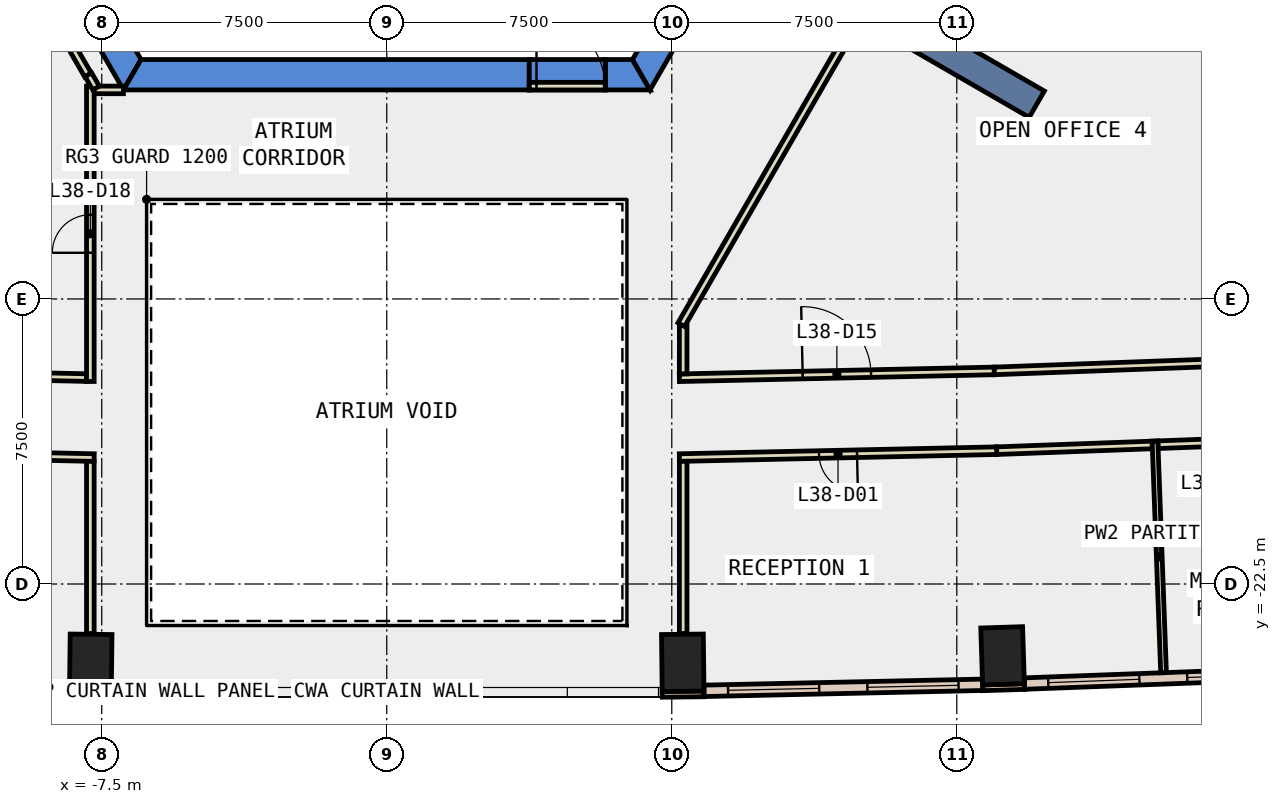
"""IFC4 building model, lengths in metres.
Left out: names, types, materials, properties, quantities, classifications, styles, units other than length and angle.
Written with IfcOpenShell. Run it as: python <this file> out.ifc"""

import sys

from ifc_helpers import new_model, si_unit, direction, frame, frame_2d, origin, origin_2d, place, context, subcontext, project, spatial, polyline, rectangle, outline, extrude, element, fill, save


model = new_model("IFC4")
c1 = context("Model", 3, precision=1e-05, world=origin(), true_north=direction((0.0, 1.0)))
c2 = subcontext(c1, "Body", "Model", "MODEL_VIEW")
j1 = project(units=[si_unit("LENGTHUNIT", "METRE"), si_unit("PLANEANGLEUNIT", "RADIAN")], contexts=[c1])
p1 = place(None, origin())
s1 = spatial("IfcSite", under=j1, at=p1, CompositionType="ELEMENT")
p2 = place(p1, origin())
s2 = spatial("IfcBuilding", under=s1, at=p2, CompositionType="ELEMENT")
p3 = place(p2, frame((0.0, 0.0, 171.8)))
s3 = spatial("IfcBuildingStorey", under=s2, at=p3, CompositionType="ELEMENT", Elevation=171.8)
for number, where, z_axis, x_axis in (
    (1, (-7.789, -24.573, -0.4), (0.0, 0.0, 1.0), (-1.0, 0.012, 0.0)),
    (2, (7.789, -24.573, -0.4), (0.0, 0.0, 1.0), (1.0, 0.012, 0.0)),
    (3, (16.205, -24.39, -0.4), (0.0, 0.0, 1.0), (0.999, 0.032, 0.0)),
):
    element("IfcColumn", number, at=place(p3, frame(where, z_axis=z_axis, x_axis=x_axis)), inside=s3, PredefinedType="COLUMN", context=c2, shape_type="SweptSolid", body=[
        extrude(rectangle(XDim=1.1, YDim=1.5, at=origin_2d()), origin(), (0.0, 0.0, 1.0), 4.2),
    ])
p4 = place(p3, frame((0.0, 0.0, -0.4)))
e4 = element("IfcWall", 4, at=p4, inside=s3, PredefinedType="SHEAR", context=c2, shape_type="SweptSolid", body=[
    extrude(outline(polyline([(-13.856, 2.5), (-6.928, -9.5), (-6.466, -8.7), (-12.933, 2.5), (-13.856, 2.5)])), origin(), (0.0, 0.0, 1.0), 4.2),
])
p5 = place(p3, frame((0.0, 0.0, -0.4)))
e5 = element("IfcWall", 5, at=p5, inside=s3, PredefinedType="SHEAR", context=c2, shape_type="SweptSolid", body=[
    extrude(outline(polyline([(3.75, -9.5), (3.75, -8.7), (-6.466, -8.7), (-6.928, -9.5), (3.75, -9.5)])), origin(), (0.0, 0.0, 1.0), 4.2),
])
p6 = place(p3, frame((0.0, 0.0, -0.4)))
e6 = element("IfcWall", 6, at=p6, inside=s3, PredefinedType="SHEAR", context=c2, shape_type="SweptSolid", body=[
    extrude(outline(polyline([(5.75, -8.7), (5.75, -9.5), (6.928, -9.5), (6.466, -8.7), (5.75, -8.7)])), origin(), (0.0, 0.0, 1.0), 4.2),
])
p7 = place(p3, frame((0.0, 0.0, 3.6)))
e7 = element("IfcWall", 7, at=p7, inside=s3, PredefinedType="SHEAR", context=c2, shape_type="SweptSolid", body=[
    extrude(outline(polyline([(5.75, -9.5), (5.75, -8.7), (3.75, -8.7), (3.75, -9.5), (5.75, -9.5)])), origin(), (0.0, 0.0, 1.0), 0.2),
])
p8 = place(p3, frame((0.0, 0.0, -0.4)))
e8 = element("IfcWall", 8, at=p8, inside=s3, PredefinedType="SHEAR", context=c2, shape_type="SweptSolid", body=[
    extrude(outline(polyline([(8.117, -7.44), (7.424, -7.04), (6.466, -8.7), (6.928, -9.5), (8.117, -7.44)])), origin(), (0.0, 0.0, 1.0), 4.2),
])
p9 = place(p3, frame((9.31, -5.375, -0.4), z_axis=(0.0, 0.0, 1.0), x_axis=(0.866017533419, -0.500013631625, 0.0)))
e9 = element("IfcWall", 9, at=p9, inside=s3, PredefinedType="SHEAR", context=c2, shape_type="SweptSolid", body=[
    extrude(rectangle(XDim=9.0, YDim=0.8, at=frame_2d((4.5, 0.0))), origin(), (0.0, 0.0, 1.0), 4.2),
])
for number, where, z_axis, x_axis in (
    (10, (-8.349, -25.392, 0.0), (0.0, 0.0, 1.0), (1.0, -0.011, 0.0)),
    (11, (7.249, -25.404, 0.0), (0.0, 0.0, 1.0), (1.0, 0.011, 0.0)),
):
    element("IfcWall", number, at=place(p3, frame(where, z_axis=z_axis, x_axis=x_axis)), inside=s3, PredefinedType="STANDARD", context=c2, shape_type="SweptSolid", body=[
        extrude(rectangle(XDim=1.1, YDim=0.15, at=frame_2d((0.55, 0.0))), origin(), (0.0, 0.0, 1.0), 3.8),
    ])
p10 = place(p3, frame((15.682, -25.232, 0.0), z_axis=(0.0, 0.0, 1.0), x_axis=(0.999523702549, 0.030860460829, 0.0)))
e12 = element("IfcWall", 12, at=p10, inside=s3, PredefinedType="STANDARD", context=c2, shape_type="SweptSolid", body=[
    extrude(rectangle(XDim=1.1, YDim=0.15, at=frame_2d((0.55, 0.0))), origin(), (0.0, 0.0, 1.0), 3.8),
])
p11 = place(p3, frame((-15.68, -25.152, 0.0), z_axis=(0.0, 0.0, 1.0), x_axis=(0.999765201774, -0.021668902196, 0.0)))
e13 = element("IfcWall", 13, at=p11, inside=s3, PredefinedType="STANDARD", context=c2, shape_type="SweptSolid", body=[
    extrude(rectangle(XDim=7.335, YDim=0.3, at=frame_2d((3.667, 0.0))), origin(), (0.0, 0.0, 1.0), 3.8),
])
p12 = place(p11, frame((0.634, 0.0, 0.9)))
e14 = element("IfcOpeningElement", 14, at=p12, cuts=e13, PredefinedType="OPENING", context=c2, shape_type="SweptSolid", body=[
    extrude(rectangle(XDim=2.4, YDim=2.6, at=frame_2d((1.2, 1.3))), frame((0.0, 0.16, 0.0), z_axis=(0.0, -1.0, 0.0), x_axis=(1.0, 0.0, 0.0)), (0.0, 0.0, 1.0), 0.32),
])
p13 = place(p11, frame((4.301, 0.0, 0.9)))
e15 = element("IfcOpeningElement", 15, at=p13, cuts=e13, PredefinedType="OPENING", context=c2, shape_type="SweptSolid", body=[
    extrude(rectangle(XDim=2.4, YDim=2.6, at=frame_2d((1.2, 1.3))), frame((0.0, 0.16, 0.0), z_axis=(0.0, -1.0, 0.0), x_axis=(1.0, 0.0, 0.0)), (0.0, 0.0, 1.0), 0.32),
])
p14 = place(p3, frame((8.347, -25.311, 0.0), z_axis=(0.0, 0.0, 1.0), x_axis=(0.999765201774, 0.021668902196, 0.0)))
e16 = element("IfcWall", 16, at=p14, inside=s3, PredefinedType="STANDARD", context=c2, shape_type="SweptSolid", body=[
    extrude(rectangle(XDim=7.335, YDim=0.3, at=frame_2d((3.667, 0.0))), origin(), (0.0, 0.0, 1.0), 3.8),
])
p15 = place(p14, frame((0.634, 0.0, 0.9)))
e17 = element("IfcOpeningElement", 17, at=p15, cuts=e16, PredefinedType="OPENING", context=c2, shape_type="SweptSolid", body=[
    extrude(rectangle(XDim=2.4, YDim=2.6, at=frame_2d((1.2, 1.3))), frame((0.0, 0.16, 0.0), z_axis=(0.0, -1.0, 0.0), x_axis=(1.0, 0.0, 0.0)), (0.0, 0.0, 1.0), 0.32),
])
p16 = place(p14, frame((4.301, 0.0, 0.9)))
e18 = element("IfcOpeningElement", 18, at=p16, cuts=e16, PredefinedType="OPENING", context=c2, shape_type="SweptSolid", body=[
    extrude(rectangle(XDim=2.4, YDim=2.6, at=frame_2d((1.2, 1.3))), frame((0.0, 0.16, 0.0), z_axis=(0.0, -1.0, 0.0), x_axis=(1.0, 0.0, 0.0)), (0.0, 0.0, 1.0), 0.32),
])
p17 = place(p3, frame((16.778, -25.12, 0.0), z_axis=(0.0, 0.0, 1.0), x_axis=(0.999307730926, 0.037202942236, 0.0)))
e19 = element("IfcWall", 19, at=p17, inside=s3, PredefinedType="STANDARD", context=c2, shape_type="SweptSolid", body=[
    extrude(rectangle(XDim=7.317, YDim=0.3, at=frame_2d((3.659, 0.0))), origin(), (0.0, 0.0, 1.0), 3.8),
])
p18 = place(p17, frame((0.629, 0.0, 0.9)))
e20 = element("IfcOpeningElement", 20, at=p18, cuts=e19, PredefinedType="OPENING", context=c2, shape_type="SweptSolid", body=[
    extrude(rectangle(XDim=2.4, YDim=2.6, at=frame_2d((1.2, 1.3))), frame((0.0, 0.16, 0.0), z_axis=(0.0, -1.0, 0.0), x_axis=(1.0, 0.0, 0.0)), (0.0, 0.0, 1.0), 0.32),
])
p19 = place(p17, frame((4.288, 0.0, 0.9)))
e21 = element("IfcOpeningElement", 21, at=p19, cuts=e19, PredefinedType="OPENING", context=c2, shape_type="SweptSolid", body=[
    extrude(rectangle(XDim=2.4, YDim=2.6, at=frame_2d((1.2, 1.3))), frame((0.0, 0.16, 0.0), z_axis=(0.0, -1.0, 0.0), x_axis=(1.0, 0.0, 0.0)), (0.0, 0.0, 1.0), 0.32),
])
p20 = place(p3, frame((7.7, -17.073, 0.0), z_axis=(0.0, 0.0, 1.0), x_axis=(0.999764372799, 0.021707115919, 0.0)))
e22 = element("IfcWall", 22, at=p20, inside=s3, PredefinedType="PARTITIONING", context=c2, shape_type="SweptSolid", body=[
    extrude(rectangle(XDim=8.289, YDim=0.2, at=frame_2d((4.145, 0.0))), origin(), (0.0, 0.0, 1.0), 3.8),
])
p21 = place(p20, frame((3.245, 0.0, 0.0)))
e23 = element("IfcOpeningElement", 23, at=p21, cuts=e22, PredefinedType="OPENING", context=c2, shape_type="SweptSolid", body=[
    extrude(rectangle(XDim=1.8, YDim=2.1, at=frame_2d((0.9, 1.05))), frame((0.0, 0.11, 0.0), z_axis=(0.0, -1.0, 0.0), x_axis=(1.0, 0.0, 0.0)), (0.0, 0.0, 1.0), 0.22),
])
p22 = place(p3, frame((15.987, -16.893, 0.0), z_axis=(0.0, 0.0, 1.0), x_axis=(0.999316060953, 0.036978511606, 0.0)))
e24 = element("IfcWall", 24, at=p22, inside=s3, PredefinedType="PARTITIONING", context=c2, shape_type="SweptSolid", body=[
    extrude(rectangle(XDim=7.355, YDim=0.2, at=frame_2d((3.677, 0.0))), origin(), (0.0, 0.0, 1.0), 3.8),
])
p23 = place(p3, frame((-11.278, -16.996, 0.0), z_axis=(0.0, 0.0, 1.0), x_axis=(0.999766613119, -0.021603687022, 0.0)))
e25 = element("IfcWall", 25, at=p23, inside=s3, PredefinedType="PARTITIONING", context=c2, shape_type="SweptSolid", body=[
    extrude(rectangle(XDim=3.379, YDim=0.2, at=frame_2d((1.689, 0.0))), origin(), (0.0, 0.0, 1.0), 3.8),
])
p24 = place(p3, frame((20.143, -18.841, 0.0), z_axis=(0.0, 0.0, 1.0), x_axis=(-0.999321592708, -0.036828716339, 0.0)))
e26 = element("IfcWall", 26, at=p24, inside=s3, PredefinedType="PARTITIONING", context=c2, shape_type="SweptSolid", body=[
    extrude(rectangle(XDim=4.097, YDim=0.2, at=frame_2d((2.048, 0.0))), origin(), (0.0, 0.0, 1.0), 3.8),
])
p25 = place(p3, frame((16.049, -18.992, 0.0), z_axis=(0.0, 0.0, 1.0), x_axis=(-0.999762156504, -0.021808952826, 0.0)))
e27 = element("IfcWall", 27, at=p25, inside=s3, PredefinedType="PARTITIONING", context=c2, shape_type="SweptSolid", body=[
    extrude(rectangle(XDim=8.351, YDim=0.2, at=frame_2d((4.176, 0.0))), origin(), (0.0, 0.0, 1.0), 3.8),
])
p26 = place(p25, frame((3.675, 0.0, 0.0)))
e28 = element("IfcOpeningElement", 28, at=p26, cuts=e27, PredefinedType="OPENING", context=c2, shape_type="SweptSolid", body=[
    extrude(rectangle(XDim=1.0, YDim=2.1, at=frame_2d((0.5, 1.05))), frame((0.0, 0.11, 0.0), z_axis=(0.0, -1.0, 0.0), x_axis=(1.0, 0.0, 0.0)), (0.0, 0.0, 1.0), 0.22),
])
p27 = place(p3, frame((23.62, -18.712, 0.0), z_axis=(0.0, 0.0, 1.0), x_axis=(-0.999316841287, -0.03695741767, 0.0)))
e29 = element("IfcWall", 29, at=p27, inside=s3, PredefinedType="PARTITIONING", context=c2, shape_type="SweptSolid", body=[
    extrude(rectangle(XDim=3.329, YDim=0.2, at=frame_2d((1.665, 0.0))), origin(), (0.0, 0.0, 1.0), 3.8),
])
p28 = place(p27, frame((1.165, 0.0, 0.0)))
e30 = element("IfcOpeningElement", 30, at=p28, cuts=e29, PredefinedType="OPENING", context=c2, shape_type="SweptSolid", body=[
    extrude(rectangle(XDim=1.0, YDim=2.1, at=frame_2d((0.5, 1.05))), frame((0.0, 0.11, 0.0), z_axis=(0.0, -1.0, 0.0), x_axis=(1.0, 0.0, 0.0)), (0.0, 0.0, 1.0), 0.22),
])
p29 = place(p3, frame((-7.7, -19.174, 0.0), z_axis=(0.0, 0.0, 1.0), x_axis=(-0.999762993889, 0.02177053169, 0.0)))
e31 = element("IfcWall", 31, at=p29, inside=s3, PredefinedType="PARTITIONING", context=c2, shape_type="SweptSolid", body=[
    extrude(rectangle(XDim=8.276, YDim=0.2, at=frame_2d((4.138, 0.0))), origin(), (0.0, 0.0, 1.0), 3.8),
])
p30 = place(p29, frame((3.713, 0.0, 0.0)))
e32 = element("IfcOpeningElement", 32, at=p30, cuts=e31, PredefinedType="OPENING", context=c2, shape_type="SweptSolid", body=[
    extrude(rectangle(XDim=1.0, YDim=2.1, at=frame_2d((0.5, 1.05))), frame((0.0, 0.11, 0.0), z_axis=(0.0, -1.0, 0.0), x_axis=(1.0, 0.0, 0.0)), (0.0, 0.0, 1.0), 0.22),
])
p31 = place(p3, frame((7.8, -15.69, 0.0), z_axis=(0.0, 0.0, 1.0), x_axis=(0.0, -1.0, 0.0)))
e33 = element("IfcWall", 33, at=p31, inside=s3, PredefinedType="PARTITIONING", context=c2, shape_type="SweptSolid", body=[
    extrude(rectangle(XDim=1.281, YDim=0.2, at=frame_2d((0.641, 0.0))), origin(), (0.0, 0.0, 1.0), 3.8),
])
p32 = place(p3, frame((-7.722, -9.499, 0.0), z_axis=(0.0, 0.0, 1.0), x_axis=(1.0, 0.0, 0.0)))
e34 = element("IfcWall", 34, at=p32, inside=s3, PredefinedType="PARTITIONING", context=c2, shape_type="SweptSolid", body=[
    extrude(rectangle(XDim=0.793, YDim=0.2, at=frame_2d((0.396, 0.0))), origin(), (0.0, 0.0, 1.0), 3.8),
])
p33 = place(p3, frame((-7.8, -17.171, 0.0), z_axis=(0.0, 0.0, 1.0), x_axis=(0.0, 1.0, 0.0)))
e35 = element("IfcWall", 35, at=p33, inside=s3, PredefinedType="PARTITIONING", context=c2, shape_type="SweptSolid", body=[
    extrude(rectangle(XDim=7.772, YDim=0.2, at=frame_2d((3.886, 0.0))), origin(), (0.0, 0.0, 1.0), 3.8),
])
p34 = place(p33, frame((3.386, 0.0, 0.0)))
e36 = element("IfcOpeningElement", 36, at=p34, cuts=e35, PredefinedType="OPENING", context=c2, shape_type="SweptSolid", body=[
    extrude(rectangle(XDim=1.0, YDim=2.1, at=frame_2d((0.5, 1.05))), frame((0.0, 0.11, 0.0), z_axis=(0.0, -1.0, 0.0), x_axis=(1.0, 0.0, 0.0)), (0.0, 0.0, 1.0), 0.22),
])
for number, where, z_axis, x_axis in (
    (37, (7.8, -19.272, 0.0), (0.0, 0.0, 1.0), (0.0, -1.0, 0.0)),
    (38, (-7.8, -23.803, 0.0), (0.0, 0.0, 1.0), (0.0, 1.0, 0.0)),
):
    element("IfcWall", number, at=place(p3, frame(where, z_axis=z_axis, x_axis=x_axis)), inside=s3, PredefinedType="PARTITIONING", context=c2, shape_type="SweptSolid", body=[
        extrude(rectangle(XDim=4.531, YDim=0.2, at=frame_2d((2.266, 0.0))), origin(), (0.0, 0.0, 1.0), 3.8),
    ])
p35 = place(p3, frame((-7.862, -9.107, 0.0), z_axis=(0.0, 0.0, 1.0), x_axis=(-0.499994038704, 0.866028845513, 0.0)))
e39 = element("IfcWall", 39, at=p35, inside=s3, PredefinedType="PARTITIONING", context=c2, shape_type="SweptSolid", body=[
    extrude(rectangle(XDim=2.568, YDim=0.2, at=frame_2d((1.284, 0.0))), origin(), (0.0, 0.0, 1.0), 3.8),
])
p36 = place(p3, frame((-7.65, -9.451, 0.0), z_axis=(0.0, 0.0, 1.0), x_axis=(-0.500297731093, 0.865853440406, 0.0)))
e40 = element("IfcWall", 40, at=p36, inside=s3, PredefinedType="PARTITIONING", context=c2, shape_type="SweptSolid", body=[
    extrude(rectangle(XDim=0.404, YDim=0.2, at=frame_2d((0.202, 0.0))), origin(), (0.0, 0.0, 1.0), 3.8),
])
p37 = place(p3, frame((20.215, -18.738, 0.0), z_axis=(0.0, 0.0, 1.0), x_axis=(0.037020542149, -0.999314504778, 0.0)))
e41 = element("IfcWall", 41, at=p37, inside=s3, PredefinedType="PARTITIONING", context=c2, shape_type="SweptSolid", body=[
    extrude(rectangle(XDim=6.1, YDim=0.15, at=frame_2d((3.05, 0.0))), origin(), (0.0, 0.0, 1.0), 3.8),
])
p38 = place(p3, frame((3.75, -9.4, 0.0), z_axis=(0.0, 0.0, 1.0), x_axis=(1.0, 0.0, 0.0)))
e42 = element("IfcWall", 42, at=p38, inside=s3, PredefinedType="PARTITIONING", context=c2, shape_type="SweptSolid", body=[
    extrude(rectangle(XDim=2.0, YDim=0.2, at=frame_2d((1.0, 0.0))), origin(), (0.0, 0.0, 1.0), 2.4),
])
p39 = place(p38, frame((0.19, 0.0, 0.0)))
e43 = element("IfcOpeningElement", 43, at=p39, cuts=e42, PredefinedType="OPENING", context=c2, shape_type="SweptSolid", body=[
    extrude(rectangle(XDim=1.8, YDim=2.1, at=frame_2d((0.9, 1.05))), frame((0.0, 0.11, 0.0), z_axis=(0.0, -1.0, 0.0), x_axis=(1.0, 0.0, 0.0)), (0.0, 0.0, 1.0), 0.22),
])
p40 = place(p3, frame((12.401, -7.621, 0.0), z_axis=(0.0, 0.0, 1.0), x_axis=(-0.499983724212, -0.866034800411, 0.0)))
e44 = element("IfcWall", 44, at=p40, inside=s3, PredefinedType="PARTITIONING", context=c2, shape_type="SweptSolid", body=[
    extrude(rectangle(XDim=9.302, YDim=0.2, at=frame_2d((4.651, 0.0))), origin(), (0.0, 0.0, 1.0), 3.8),
])
p41 = place(p15, origin())
e45 = element("IfcWindow", 45, at=p41, inside=s3, PartitioningType="SINGLE_PANEL", PredefinedType="WINDOW", context=c2, shape_type="SweptSolid", body=[
    extrude(rectangle(XDim=2.4, YDim=2.6, at=frame_2d((1.2, 1.3))), frame((0.0, 0.03, 0.0), z_axis=(0.0, -1.0, 0.0), x_axis=(1.0, 0.0, 0.0)), (0.0, 0.0, 1.0), 0.06),
])
fill(e17, e45)
p42 = place(p16, origin())
e46 = element("IfcWindow", 46, at=p42, inside=s3, PartitioningType="SINGLE_PANEL", PredefinedType="WINDOW", context=c2, shape_type="SweptSolid", body=[
    extrude(rectangle(XDim=2.4, YDim=2.6, at=frame_2d((1.2, 1.3))), frame((0.0, 0.03, 0.0), z_axis=(0.0, -1.0, 0.0), x_axis=(1.0, 0.0, 0.0)), (0.0, 0.0, 1.0), 0.06),
])
fill(e18, e46)
p43 = place(p18, origin())
e47 = element("IfcWindow", 47, at=p43, inside=s3, PartitioningType="SINGLE_PANEL", PredefinedType="WINDOW", context=c2, shape_type="SweptSolid", body=[
    extrude(rectangle(XDim=2.4, YDim=2.6, at=frame_2d((1.2, 1.3))), frame((0.0, 0.03, 0.0), z_axis=(0.0, -1.0, 0.0), x_axis=(1.0, 0.0, 0.0)), (0.0, 0.0, 1.0), 0.06),
])
fill(e20, e47)
p44 = place(p19, origin())
e48 = element("IfcWindow", 48, at=p44, inside=s3, PartitioningType="SINGLE_PANEL", PredefinedType="WINDOW", context=c2, shape_type="SweptSolid", body=[
    extrude(rectangle(XDim=2.4, YDim=2.6, at=frame_2d((1.2, 1.3))), frame((0.0, 0.03, 0.0), z_axis=(0.0, -1.0, 0.0), x_axis=(1.0, 0.0, 0.0)), (0.0, 0.0, 1.0), 0.06),
])
fill(e21, e48)
p45 = place(p26, origin())
e49 = element("IfcDoor", 49, at=p45, inside=s3, OperationType="SINGLE_SWING_RIGHT", PredefinedType="DOOR", context=c2, shape_type="SweptSolid", body=[
    extrude(rectangle(XDim=1.0, YDim=2.1, at=frame_2d((0.5, 1.05))), frame((0.0, 0.025, 0.0), z_axis=(0.0, -1.0, 0.0), x_axis=(1.0, 0.0, 0.0)), (0.0, 0.0, 1.0), 0.05),
])
fill(e28, e49)
p46 = place(p21, origin())
e50 = element("IfcDoor", 50, at=p46, inside=s3, OperationType="DOUBLE_DOOR_SINGLE_SWING", PredefinedType="DOOR", context=c2, shape_type="SweptSolid", body=[
    extrude(rectangle(XDim=1.8, YDim=2.1, at=frame_2d((0.9, 1.05))), frame((0.0, 0.025, 0.0), z_axis=(0.0, -1.0, 0.0), x_axis=(1.0, 0.0, 0.0)), (0.0, 0.0, 1.0), 0.05),
])
fill(e23, e50)
p47 = place(p34, origin())
e51 = element("IfcDoor", 51, at=p47, inside=s3, OperationType="SINGLE_SWING_LEFT", PredefinedType="DOOR", context=c2, shape_type="SweptSolid", body=[
    extrude(rectangle(XDim=1.0, YDim=2.1, at=frame_2d((0.5, 1.05))), frame((0.0, 0.025, 0.0), z_axis=(0.0, -1.0, 0.0), x_axis=(1.0, 0.0, 0.0)), (0.0, 0.0, 1.0), 0.05),
])
fill(e36, e51)
p48 = place(p39, origin())
e52 = element("IfcDoor", 52, at=p48, inside=s3, OperationType="DOUBLE_DOOR_SINGLE_SWING", PredefinedType="DOOR", context=c2, shape_type="SweptSolid", body=[
    extrude(rectangle(XDim=1.8, YDim=2.1, at=frame_2d((0.9, 1.05))), frame((0.0, 0.025, 0.0), z_axis=(0.0, -1.0, 0.0), x_axis=(1.0, 0.0, 0.0)), (0.0, 0.0, 1.0), 0.05),
])
fill(e43, e52)
save(model, sys.argv[1])
